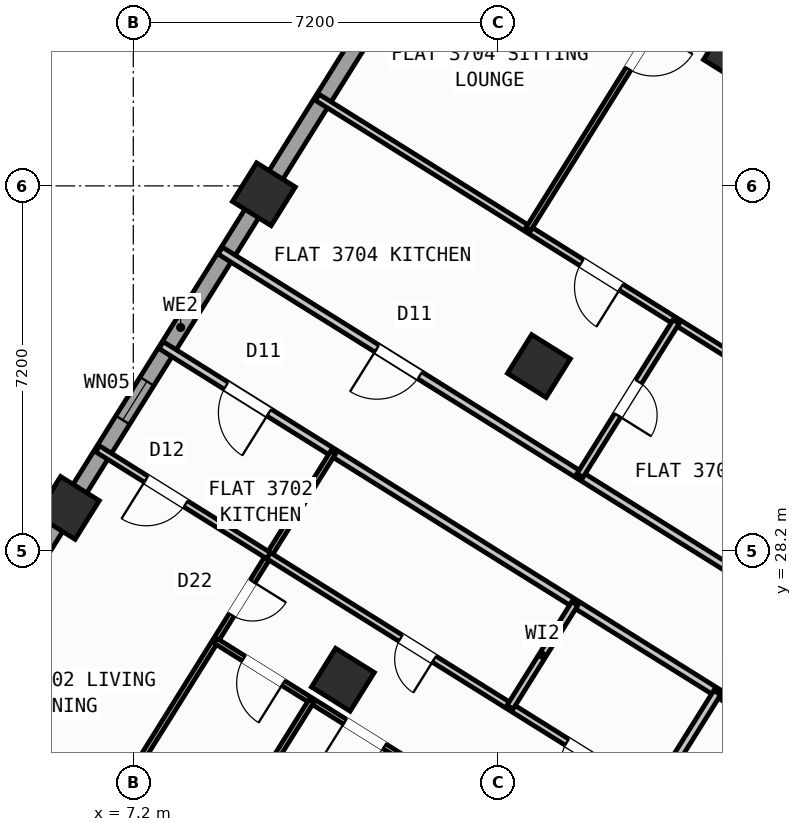
"""IFC4 building model, lengths in metres.
Left out: names, types, materials, properties, quantities, classifications, styles, units other than length and angle.
Written with IfcOpenShell. Run it as: python <this file> out.ifc"""

import sys

from ifc_helpers import new_model, si_unit, direction, frame, frame_2d, origin, origin_2d, place, context, subcontext, project, spatial, rectangle, hollow_rectangle, extrude, source, transform, mapped, element, fill, save


model = new_model("IFC4")
c1 = context("Model", 3, precision=1e-05, world=origin(), true_north=direction((0.0, 1.0)))
c2 = subcontext(c1, "Body", "Model", "MODEL_VIEW")
j1 = project(units=[si_unit("LENGTHUNIT", "METRE"), si_unit("PLANEANGLEUNIT", "RADIAN")], contexts=[c1])
p1 = place(None, origin())
s1 = spatial("IfcSite", under=j1, at=p1, CompositionType="ELEMENT")
p2 = place(p1, origin())
s2 = spatial("IfcBuilding", under=s1, at=p2, CompositionType="ELEMENT")
p3 = place(p2, frame((0.0, 0.0, 147.9)))
s3 = spatial("IfcBuildingStorey", under=s2, at=p3, CompositionType="ELEMENT", Elevation=147.9)
m1 = source(origin(), c2, "Body", "SweptSolid", [
    extrude(hollow_rectangle(XDim=0.9, YDim=0.9, WallThickness=0.036, at=origin_2d()), origin(), (0.0, 0.0, 1.0), 3.6),
])
for number, where, z_axis, x_axis in (
    (1, (19.073, 38.034, 0.0), (0.0, 0.0, 1.0), (-0.848, 0.53, 0.0)),
    (2, (15.205, 31.844, 0.0), (0.0, 0.0, 1.0), (-0.848, 0.53, 0.0)),
    (3, (11.336, 25.653, 0.0), (0.0, 0.0, 1.0), (-0.848, 0.53, 0.0)),
    (4, (9.777, 35.235, 0.0), (0.0, 0.0, 1.0), (-0.848, 0.53, 0.0)),
    (5, (5.909, 29.044, 0.0), (0.0, 0.0, 1.0), (-0.848, 0.53, 0.0)),
):
    element("IfcColumn", number, at=place(p3, frame(where, z_axis=z_axis, x_axis=x_axis)), inside=s3, PredefinedType="COLUMN", context=c2, shape_type="MappedRepresentation", body=[
        mapped(m1, transform((0.0, 0.0, 0.0), scale=1.0)),
    ])
p4 = place(p3, frame((2.415, 23.452, 0.0), z_axis=(0.0, 0.0, 1.0), x_axis=(0.52991049553, 0.848053575387, 0.0)))
e6 = element("IfcWall", 6, at=p4, inside=s3, PredefinedType="STANDARD", context=c2, shape_type="SweptSolid", body=[
    extrude(rectangle(XDim=21.587, YDim=0.32, at=frame_2d((10.794, 0.0))), origin(), (0.0, 0.0, 1.0), 2.775),
])
p5 = place(p4, frame((2.356, 0.0, 0.8)))
e7 = element("IfcOpeningElement", 7, at=p5, cuts=e6, PredefinedType="OPENING", context=c2, shape_type="SweptSolid", body=[
    extrude(rectangle(XDim=2.1, YDim=1.55, at=frame_2d((1.05, 0.775))), frame((0.0, 0.17, 0.0), z_axis=(0.0, -1.0, 0.0), x_axis=(1.0, 0.0, 0.0)), (0.0, 0.0, 1.0), 0.34),
])
p6 = place(p4, frame((8.639, 0.0, 1.0)))
e8 = element("IfcOpeningElement", 8, at=p6, cuts=e6, PredefinedType="OPENING", context=c2, shape_type="SweptSolid", body=[
    extrude(rectangle(XDim=0.9, YDim=1.25, at=frame_2d((0.45, 0.625))), frame((0.0, 0.17, 0.0), z_axis=(0.0, -1.0, 0.0), x_axis=(1.0, 0.0, 0.0)), (0.0, 0.0, 1.0), 0.34),
])
p7 = place(p4, frame((17.744, 0.0, 0.85)))
e9 = element("IfcOpeningElement", 9, at=p7, cuts=e6, PredefinedType="OPENING", context=c2, shape_type="SweptSolid", body=[
    extrude(rectangle(XDim=1.5, YDim=1.5, at=frame_2d((0.75, 0.75))), frame((0.0, 0.17, 0.0), z_axis=(0.0, -1.0, 0.0), x_axis=(1.0, 0.0, 0.0)), (0.0, 0.0, 1.0), 0.34),
])
p8 = place(p3, frame((14.138, 41.825, 0.0), z_axis=(0.0, 0.0, 1.0), x_axis=(0.848046498049, -0.529921821731, 0.0)))
e10 = element("IfcWall", 10, at=p8, inside=s3, PredefinedType="STANDARD", context=c2, shape_type="SweptSolid", body=[
    extrude(rectangle(XDim=31.588, YDim=0.32, at=frame_2d((15.794, 0.0))), origin(), (0.0, 0.0, 1.0), 3.35),
])
p9 = place(p8, frame((2.949, 0.0, 0.0)))
e11 = element("IfcOpeningElement", 11, at=p9, cuts=e10, PredefinedType="OPENING", context=c2, shape_type="SweptSolid", body=[
    extrude(rectangle(XDim=1.05, YDim=2.15, at=frame_2d((0.525, 1.075))), frame((0.0, 0.17, 0.0), z_axis=(0.0, -1.0, 0.0), x_axis=(1.0, 0.0, 0.0)), (0.0, 0.0, 1.0), 0.34),
])
p10 = place(p8, frame((0.861, 0.0, 0.85)))
e12 = element("IfcOpeningElement", 12, at=p10, cuts=e10, PredefinedType="OPENING", context=c2, shape_type="SweptSolid", body=[
    extrude(rectangle(XDim=1.5, YDim=1.5, at=frame_2d((0.75, 0.75))), frame((0.0, 0.17, 0.0), z_axis=(0.0, -1.0, 0.0), x_axis=(1.0, 0.0, 0.0)), (0.0, 0.0, 1.0), 0.34),
])
p11 = place(p8, frame((8.494, 0.0, 0.85)))
e13 = element("IfcOpeningElement", 13, at=p11, cuts=e10, PredefinedType="OPENING", context=c2, shape_type="SweptSolid", body=[
    extrude(rectangle(XDim=1.8, YDim=1.5, at=frame_2d((0.9, 0.75))), frame((0.0, 0.17, 0.0), z_axis=(0.0, -1.0, 0.0), x_axis=(1.0, 0.0, 0.0)), (0.0, 0.0, 1.0), 0.34),
])
p12 = place(p8, frame((13.874, 0.0, 0.85)))
e14 = element("IfcOpeningElement", 14, at=p12, cuts=e10, PredefinedType="OPENING", context=c2, shape_type="SweptSolid", body=[
    extrude(rectangle(XDim=1.5, YDim=1.5, at=frame_2d((0.75, 0.75))), frame((0.0, 0.17, 0.0), z_axis=(0.0, -1.0, 0.0), x_axis=(1.0, 0.0, 0.0)), (0.0, 0.0, 1.0), 0.34),
])
p13 = place(p8, frame((17.104, 0.0, 1.0)))
e15 = element("IfcOpeningElement", 15, at=p13, cuts=e10, PredefinedType="OPENING", context=c2, shape_type="SweptSolid", body=[
    extrude(rectangle(XDim=0.9, YDim=1.25, at=frame_2d((0.45, 0.625))), frame((0.0, 0.17, 0.0), z_axis=(0.0, -1.0, 0.0), x_axis=(1.0, 0.0, 0.0)), (0.0, 0.0, 1.0), 0.34),
])
p14 = place(p8, frame((22.144, 0.0, 1.0)))
e16 = element("IfcOpeningElement", 16, at=p14, cuts=e10, PredefinedType="OPENING", context=c2, shape_type="SweptSolid", body=[
    extrude(rectangle(XDim=0.9, YDim=1.25, at=frame_2d((0.45, 0.625))), frame((0.0, 0.17, 0.0), z_axis=(0.0, -1.0, 0.0), x_axis=(1.0, 0.0, 0.0)), (0.0, 0.0, 1.0), 0.34),
])
p15 = place(p8, frame((27.744, 0.0, 1.0)))
e17 = element("IfcOpeningElement", 17, at=p15, cuts=e10, PredefinedType="OPENING", context=c2, shape_type="SweptSolid", body=[
    extrude(rectangle(XDim=0.9, YDim=1.25, at=frame_2d((0.45, 0.625))), frame((0.0, 0.17, 0.0), z_axis=(0.0, -1.0, 0.0), x_axis=(1.0, 0.0, 0.0)), (0.0, 0.0, 1.0), 0.34),
])
p16 = place(p3, frame((23.104, 25.256, 0.0), z_axis=(0.0, 0.0, 1.0), x_axis=(-0.848041752158, 0.529929416617, 0.0)))
e18 = element("IfcWall", 18, at=p16, inside=s3, PredefinedType="PARTITIONING", context=c2, shape_type="SweptSolid", body=[
    extrude(rectangle(XDim=16.73, YDim=0.16, at=frame_2d((8.365, 0.0))), origin(), (0.0, 0.0, 1.0), 3.34),
])
p17 = place(p16, frame((2.22, 0.0, 0.0)))
e19 = element("IfcOpeningElement", 19, at=p17, cuts=e18, PredefinedType="OPENING", context=c2, shape_type="SweptSolid", body=[
    extrude(rectangle(XDim=0.86, YDim=2.05, at=frame_2d((0.43, 1.025))), frame((0.0, 0.09, 0.0), z_axis=(0.0, -1.0, 0.0), x_axis=(1.0, 0.0, 0.0)), (0.0, 0.0, 1.0), 0.18),
])
p18 = place(p16, frame((12.084, 0.0, 0.0)))
e20 = element("IfcOpeningElement", 20, at=p18, cuts=e18, PredefinedType="OPENING", context=c2, shape_type="SweptSolid", body=[
    extrude(rectangle(XDim=1.0, YDim=2.1, at=frame_2d((0.5, 1.05))), frame((0.0, 0.09, 0.0), z_axis=(0.0, -1.0, 0.0), x_axis=(1.0, 0.0, 0.0)), (0.0, 0.0, 1.0), 0.18),
])
p19 = place(p3, frame((21.938, 23.391, 0.0), z_axis=(0.0, 0.0, 1.0), x_axis=(-0.848045850158, 0.529922858565, 0.0)))
e21 = element("IfcWall", 21, at=p19, inside=s3, PredefinedType="PARTITIONING", context=c2, shape_type="SweptSolid", body=[
    extrude(rectangle(XDim=16.73, YDim=0.16, at=frame_2d((8.365, 0.0))), origin(), (0.0, 0.0, 1.0), 3.34),
])
p20 = place(p19, frame((2.22, 0.0, 0.0)))
e22 = element("IfcOpeningElement", 22, at=p20, cuts=e21, PredefinedType="OPENING", context=c2, shape_type="SweptSolid", body=[
    extrude(rectangle(XDim=0.86, YDim=2.05, at=frame_2d((0.43, 1.025))), frame((0.0, 0.09, 0.0), z_axis=(0.0, -1.0, 0.0), x_axis=(1.0, 0.0, 0.0)), (0.0, 0.0, 1.0), 0.18),
])
p21 = place(p19, frame((14.22, 0.0, 0.0)))
e23 = element("IfcOpeningElement", 23, at=p21, cuts=e21, PredefinedType="OPENING", context=c2, shape_type="SweptSolid", body=[
    extrude(rectangle(XDim=1.0, YDim=2.1, at=frame_2d((0.5, 1.05))), frame((0.0, 0.09, 0.0), z_axis=(0.0, -1.0, 0.0), x_axis=(1.0, 0.0, 0.0)), (0.0, 0.0, 1.0), 0.18),
])
p22 = place(p3, frame((18.724, 25.399, 0.0), z_axis=(0.0, 0.0, 1.0), x_axis=(-0.529890499457, -0.848066069705, 0.0)))
e24 = element("IfcWall", 24, at=p22, inside=s3, PredefinedType="PARTITIONING", context=c2, shape_type="SweptSolid", body=[
    extrude(rectangle(XDim=3.238, YDim=0.16, at=frame_2d((1.619, 0.0))), origin(), (0.0, 0.0, 1.0), 2.775),
])
p23 = place(p3, frame((20.624, 24.212, 0.0), z_axis=(0.0, 0.0, 1.0), x_axis=(-0.529919283494, -0.848048084121, 0.0)))
e25 = element("IfcWall", 25, at=p23, inside=s3, PredefinedType="PLUMBINGWALL", context=c2, shape_type="SweptSolid", body=[
    extrude(rectangle(XDim=5.51, YDim=0.14, at=frame_2d((2.755, 0.0))), origin(), (0.0, 0.0, 1.0), 2.995),
])
p24 = place(p23, frame((2.365, 0.0, 0.0)))
e26 = element("IfcOpeningElement", 26, at=p24, cuts=e25, PredefinedType="OPENING", context=c2, shape_type="SweptSolid", body=[
    extrude(rectangle(XDim=0.78, YDim=2.05, at=frame_2d((0.39, 1.025))), frame((0.0, 0.08, 0.0), z_axis=(0.0, -1.0, 0.0), x_axis=(1.0, 0.0, 0.0)), (0.0, 0.0, 1.0), 0.16),
])
p25 = place(p3, frame((11.143, 30.136, 0.0), z_axis=(0.0, 0.0, 1.0), x_axis=(-0.529922479612, -0.848046086956, 0.0)))
e27 = element("IfcWall", 27, at=p25, inside=s3, PredefinedType="PARTITIONING", context=c2, shape_type="SweptSolid", body=[
    extrude(rectangle(XDim=10.62, YDim=0.11, at=frame_2d((5.31, 0.0))), origin(), (0.0, 0.0, 1.0), 3.34),
])
p26 = place(p25, frame((3.0, 0.0, 0.0)))
e28 = element("IfcOpeningElement", 28, at=p26, cuts=e27, PredefinedType="OPENING", context=c2, shape_type="SweptSolid", body=[
    extrude(rectangle(XDim=0.78, YDim=2.05, at=frame_2d((0.39, 1.025))), frame((0.0, 0.065, 0.0), z_axis=(0.0, -1.0, 0.0), x_axis=(1.0, 0.0, 0.0)), (0.0, 0.0, 1.0), 0.13),
])
p27 = place(p3, frame((9.871, 28.101, 0.0), z_axis=(0.0, 0.0, 1.0), x_axis=(-0.848025873403, 0.529954826413, 0.0)))
e29 = element("IfcWall", 29, at=p27, inside=s3, PredefinedType="PLUMBINGWALL", context=c2, shape_type="SweptSolid", body=[
    extrude(rectangle(XDim=3.98, YDim=0.14, at=frame_2d((1.99, 0.0))), origin(), (0.0, 0.0, 1.0), 3.34),
])
p28 = place(p27, frame((1.93, 0.0, 0.0)))
e30 = element("IfcOpeningElement", 30, at=p28, cuts=e29, PredefinedType="OPENING", context=c2, shape_type="SweptSolid", body=[
    extrude(rectangle(XDim=0.92, YDim=2.08, at=frame_2d((0.46, 1.04))), frame((0.0, 0.08, 0.0), z_axis=(0.0, -1.0, 0.0), x_axis=(1.0, 0.0, 0.0)), (0.0, 0.0, 1.0), 0.16),
])
p29 = place(p3, frame((17.452, 23.364, 0.0), z_axis=(0.0, 0.0, 1.0), x_axis=(-0.848044326704, 0.52992529657, 0.0)))
e31 = element("IfcWall", 31, at=p29, inside=s3, PredefinedType="PLUMBINGWALL", context=c2, shape_type="SweptSolid", body=[
    extrude(rectangle(XDim=8.94, YDim=0.14, at=frame_2d((4.47, 0.0))), origin(), (0.0, 0.0, 1.0), 3.34),
])
p30 = place(p29, frame((5.087, 0.0, 0.0)))
e32 = element("IfcOpeningElement", 32, at=p30, cuts=e31, PredefinedType="OPENING", context=c2, shape_type="SweptSolid", body=[
    extrude(rectangle(XDim=0.78, YDim=2.05, at=frame_2d((0.39, 1.025))), frame((0.0, 0.08, 0.0), z_axis=(0.0, -1.0, 0.0), x_axis=(1.0, 0.0, 0.0)), (0.0, 0.0, 1.0), 0.16),
])
p31 = place(p29, frame((1.218, 0.0, 0.0)))
e33 = element("IfcOpeningElement", 33, at=p31, cuts=e31, PredefinedType="OPENING", context=c2, shape_type="SweptSolid", body=[
    extrude(rectangle(XDim=0.78, YDim=2.05, at=frame_2d((0.39, 1.025))), frame((0.0, 0.08, 0.0), z_axis=(0.0, -1.0, 0.0), x_axis=(1.0, 0.0, 0.0)), (0.0, 0.0, 1.0), 0.16),
])
p32 = place(p3, frame((15.913, 27.156, 0.0), z_axis=(0.0, 0.0, 1.0), x_axis=(-0.529935194983, -0.848038141311, 0.0)))
e34 = element("IfcWall", 34, at=p32, inside=s3, PredefinedType="PLUMBINGWALL", context=c2, shape_type="SweptSolid", body=[
    extrude(rectangle(XDim=2.41, YDim=0.14, at=frame_2d((1.205, 0.0))), origin(), (0.0, 0.0, 1.0), 3.34),
])
p33 = place(p3, frame((16.403, 21.685, 0.0), z_axis=(0.0, 0.0, 1.0), x_axis=(-0.848044326704, 0.52992529657, 0.0)))
e35 = element("IfcWall", 35, at=p33, inside=s3, PredefinedType="PARTITIONING", context=c2, shape_type="SweptSolid", body=[
    extrude(rectangle(XDim=8.94, YDim=0.11, at=frame_2d((4.47, 0.0))), origin(), (0.0, 0.0, 1.0), 3.34),
])
p34 = place(p33, frame((0.657, 0.0, 0.0)))
e36 = element("IfcOpeningElement", 36, at=p34, cuts=e35, PredefinedType="OPENING", context=c2, shape_type="SweptSolid", body=[
    extrude(rectangle(XDim=0.92, YDim=2.08, at=frame_2d((0.46, 1.04))), frame((0.0, 0.065, 0.0), z_axis=(0.0, -1.0, 0.0), x_axis=(1.0, 0.0, 0.0)), (0.0, 0.0, 1.0), 0.13),
])
p35 = place(p33, frame((2.893, 0.0, 0.0)))
e37 = element("IfcOpeningElement", 37, at=p35, cuts=e35, PredefinedType="OPENING", context=c2, shape_type="SweptSolid", body=[
    extrude(rectangle(XDim=0.92, YDim=2.08, at=frame_2d((0.46, 1.04))), frame((0.0, 0.065, 0.0), z_axis=(0.0, -1.0, 0.0), x_axis=(1.0, 0.0, 0.0)), (0.0, 0.0, 1.0), 0.13),
])
p36 = place(p33, frame((5.008, 0.0, 0.0)))
e38 = element("IfcOpeningElement", 38, at=p36, cuts=e35, PredefinedType="OPENING", context=c2, shape_type="SweptSolid", body=[
    extrude(rectangle(XDim=0.92, YDim=2.08, at=frame_2d((0.46, 1.04))), frame((0.0, 0.065, 0.0), z_axis=(0.0, -1.0, 0.0), x_axis=(1.0, 0.0, 0.0)), (0.0, 0.0, 1.0), 0.13),
])
p37 = place(p33, frame((7.363, 0.0, 0.0)))
e39 = element("IfcOpeningElement", 39, at=p37, cuts=e35, PredefinedType="OPENING", context=c2, shape_type="SweptSolid", body=[
    extrude(rectangle(XDim=0.92, YDim=2.08, at=frame_2d((0.46, 1.04))), frame((0.0, 0.065, 0.0), z_axis=(0.0, -1.0, 0.0), x_axis=(1.0, 0.0, 0.0)), (0.0, 0.0, 1.0), 0.13),
])
p38 = place(p3, frame((10.717, 25.238, 0.0), z_axis=(0.0, 0.0, 1.0), x_axis=(-0.52991804857, -0.848048855786, 0.0)))
e40 = element("IfcWall", 40, at=p38, inside=s3, PredefinedType="PARTITIONING", context=c2, shape_type="SweptSolid", body=[
    extrude(rectangle(XDim=6.24, YDim=0.11, at=frame_2d((3.12, 0.0))), origin(), (0.0, 0.0, 1.0), 3.34),
])
p39 = place(p3, frame((21.787, 30.301, 0.0), z_axis=(0.0, 0.0, 1.0), x_axis=(-0.848043949058, 0.52992590092, 0.0)))
e41 = element("IfcWall", 41, at=p39, inside=s3, PredefinedType="PLUMBINGWALL", context=c2, shape_type="SweptSolid", body=[
    extrude(rectangle(XDim=12.92, YDim=0.14, at=frame_2d((6.46, 0.0))), origin(), (0.0, 0.0, 1.0), 3.34),
])
p40 = place(p39, frame((5.849, 0.0, 0.0)))
e42 = element("IfcOpeningElement", 42, at=p40, cuts=e41, PredefinedType="OPENING", context=c2, shape_type="SweptSolid", body=[
    extrude(rectangle(XDim=0.92, YDim=2.08, at=frame_2d((0.46, 1.04))), frame((0.0, 0.08, 0.0), z_axis=(0.0, -1.0, 0.0), x_axis=(1.0, 0.0, 0.0)), (0.0, 0.0, 1.0), 0.16),
])
p41 = place(p3, frame((17.913, 32.721, 0.0), z_axis=(0.0, 0.0, 1.0), x_axis=(-0.529906983049, -0.848055770169, 0.0)))
e43 = element("IfcWall", 43, at=p41, inside=s3, PredefinedType="PLUMBINGWALL", context=c2, shape_type="SweptSolid", body=[
    extrude(rectangle(XDim=3.58, YDim=0.14, at=frame_2d((1.79, 0.0))), origin(), (0.0, 0.0, 1.0), 3.34),
])
p42 = place(p41, frame((1.4, 0.0, 0.0)))
e44 = element("IfcOpeningElement", 44, at=p42, cuts=e43, PredefinedType="OPENING", context=c2, shape_type="SweptSolid", body=[
    extrude(rectangle(XDim=0.78, YDim=2.05, at=frame_2d((0.39, 1.025))), frame((0.0, 0.08, 0.0), z_axis=(0.0, -1.0, 0.0), x_axis=(1.0, 0.0, 0.0)), (0.0, 0.0, 1.0), 0.16),
])
p43 = place(p3, frame((18.089, 39.498, 0.0), z_axis=(0.0, 0.0, 1.0), x_axis=(-0.529916267533, -0.848049968695, 0.0)))
e45 = element("IfcWall", 45, at=p43, inside=s3, PredefinedType="PARTITIONING", context=c2, shape_type="SweptSolid", body=[
    extrude(rectangle(XDim=5.84, YDim=0.11, at=frame_2d((2.92, 0.0))), origin(), (0.0, 0.0, 1.0), 3.34),
])
p44 = place(p43, frame((1.19, 0.0, 0.0)))
e46 = element("IfcOpeningElement", 46, at=p44, cuts=e45, PredefinedType="OPENING", context=c2, shape_type="SweptSolid", body=[
    extrude(rectangle(XDim=0.92, YDim=2.08, at=frame_2d((0.46, 1.04))), frame((0.0, 0.065, 0.0), z_axis=(0.0, -1.0, 0.0), x_axis=(1.0, 0.0, 0.0)), (0.0, 0.0, 1.0), 0.13),
])
m2 = source(origin(), c2, "Body", "SweptSolid", [
    extrude(rectangle(XDim=0.9, YDim=1.25, at=frame_2d((0.45, 0.625))), frame((0.0, 0.03, 0.0), z_axis=(0.0, -1.0, 0.0), x_axis=(1.0, 0.0, 0.0)), (0.0, 0.0, 1.0), 0.06),
])
p45 = place(p6, origin())
e47 = element("IfcWindow", 47, at=p45, inside=s3, PartitioningType="SINGLE_PANEL", PredefinedType="WINDOW", context=c2, shape_type="MappedRepresentation", body=[
    mapped(m2, transform((0.0, 0.0, 0.0), scale=1.0)),
])
fill(e8, e47)
m3 = source(origin(), c2, "Body", "SweptSolid", [
    extrude(rectangle(XDim=1.0, YDim=2.1, at=frame_2d((0.5, 1.05))), frame((0.0, 0.025, 0.0), z_axis=(0.0, -1.0, 0.0), x_axis=(1.0, 0.0, 0.0)), (0.0, 0.0, 1.0), 0.05),
])
p46 = place(p21, origin())
e48 = element("IfcDoor", 48, at=p46, inside=s3, OperationType="SINGLE_SWING_LEFT", PredefinedType="DOOR", context=c2, shape_type="MappedRepresentation", body=[
    mapped(m3, transform((0.0, 0.0, 0.0), scale=1.0)),
])
fill(e23, e48)
m4 = source(origin(), c2, "Body", "SweptSolid", [
    extrude(rectangle(XDim=0.92, YDim=2.08, at=frame_2d((0.46, 1.04))), frame((0.0, 0.025, 0.0), z_axis=(0.0, -1.0, 0.0), x_axis=(1.0, 0.0, 0.0)), (0.0, 0.0, 1.0), 0.05),
])
p47 = place(p28, origin())
e49 = element("IfcDoor", 49, at=p47, inside=s3, OperationType="SINGLE_SWING_RIGHT", PredefinedType="DOOR", context=c2, shape_type="MappedRepresentation", body=[
    mapped(m4, transform((0.0, 0.0, 0.0), scale=1.0)),
])
fill(e30, e49)
m5 = source(origin(), c2, "Body", "SweptSolid", [
    extrude(rectangle(XDim=0.78, YDim=2.05, at=frame_2d((0.39, 1.025))), frame((0.0, 0.025, 0.0), z_axis=(0.0, -1.0, 0.0), x_axis=(1.0, 0.0, 0.0)), (0.0, 0.0, 1.0), 0.05),
])
p48 = place(p26, origin())
e50 = element("IfcDoor", 50, at=p48, inside=s3, OperationType="SINGLE_SWING_LEFT", PredefinedType="DOOR", context=c2, shape_type="MappedRepresentation", body=[
    mapped(m5, transform((0.0, 0.0, 0.0), scale=1.0)),
])
fill(e28, e50)
p49 = place(p30, origin())
e51 = element("IfcDoor", 51, at=p49, inside=s3, OperationType="SINGLE_SWING_LEFT", PredefinedType="DOOR", context=c2, shape_type="MappedRepresentation", body=[
    mapped(m5, transform((0.0, 0.0, 0.0), scale=1.0)),
])
fill(e32, e51)
p50 = place(p31, origin())
e52 = element("IfcDoor", 52, at=p50, inside=s3, OperationType="SINGLE_SWING_LEFT", PredefinedType="DOOR", context=c2, shape_type="MappedRepresentation", body=[
    mapped(m5, transform((0.0, 0.0, 0.0), scale=1.0)),
])
fill(e33, e52)
p51 = place(p36, origin())
e53 = element("IfcDoor", 53, at=p51, inside=s3, OperationType="SINGLE_SWING_RIGHT", PredefinedType="DOOR", context=c2, shape_type="MappedRepresentation", body=[
    mapped(m4, transform((0.0, 0.0, 0.0), scale=1.0)),
])
fill(e38, e53)
p52 = place(p37, origin())
e54 = element("IfcDoor", 54, at=p52, inside=s3, OperationType="SINGLE_SWING_LEFT", PredefinedType="DOOR", context=c2, shape_type="MappedRepresentation", body=[
    mapped(m4, transform((0.0, 0.0, 0.0), scale=1.0)),
])
fill(e39, e54)
p53 = place(p44, origin())
e55 = element("IfcDoor", 55, at=p53, inside=s3, OperationType="SINGLE_SWING_LEFT", PredefinedType="DOOR", context=c2, shape_type="MappedRepresentation", body=[
    mapped(m4, transform((0.0, 0.0, 0.0), scale=1.0)),
])
fill(e46, e55)
p54 = place(p18, origin())
e56 = element("IfcDoor", 56, at=p54, inside=s3, OperationType="SINGLE_SWING_RIGHT", PredefinedType="DOOR", context=c2, shape_type="MappedRepresentation", body=[
    mapped(m3, transform((0.0, 0.0, 0.0), scale=1.0)),
])
fill(e20, e56)
p55 = place(p40, origin())
e57 = element("IfcDoor", 57, at=p55, inside=s3, OperationType="SINGLE_SWING_LEFT", PredefinedType="DOOR", context=c2, shape_type="MappedRepresentation", body=[
    mapped(m4, transform((0.0, 0.0, 0.0), scale=1.0)),
])
fill(e42, e57)
p56 = place(p42, origin())
e58 = element("IfcDoor", 58, at=p56, inside=s3, OperationType="SINGLE_SWING_RIGHT", PredefinedType="DOOR", context=c2, shape_type="MappedRepresentation", body=[
    mapped(m5, transform((0.0, 0.0, 0.0), scale=1.0)),
])
fill(e44, e58)
save(model, sys.argv[1])
